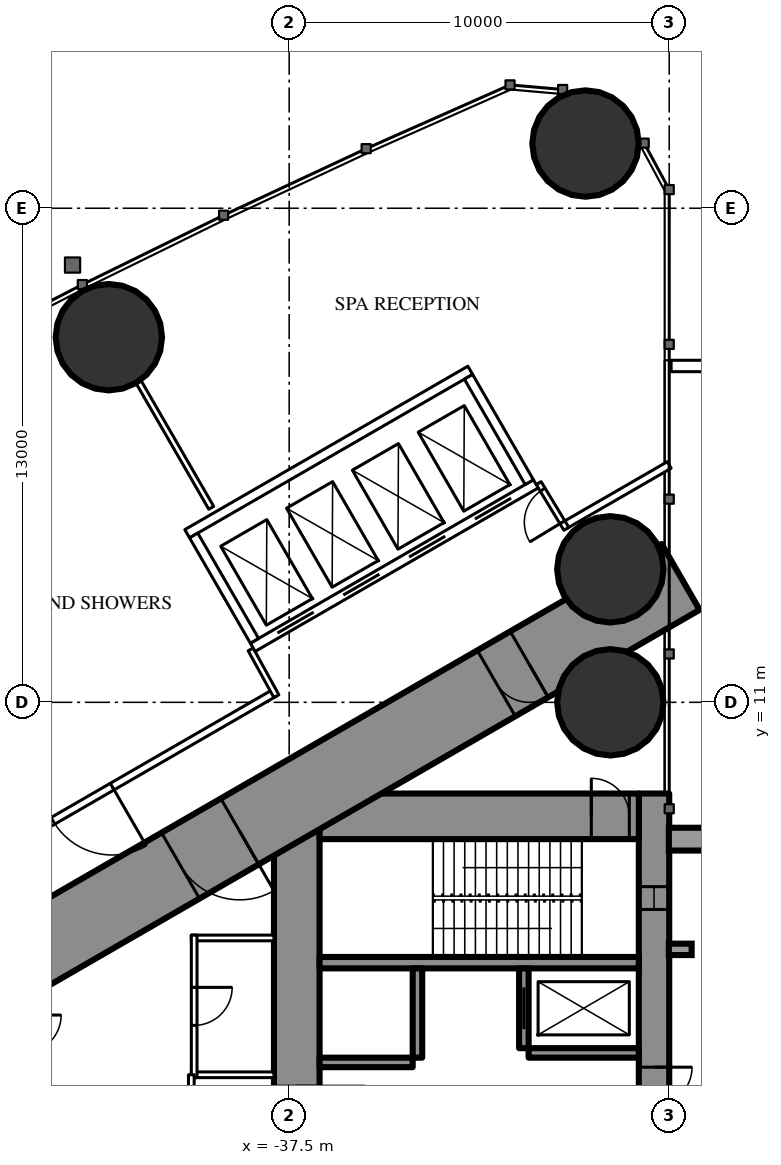
"""IFC4 building model, lengths in metres.
Left out: names, types, materials, properties, quantities, classifications, styles, units other than length and angle.
Written with IfcOpenShell. Run it as: python <this file> out.ifc"""

import sys

from ifc_helpers import new_model, si_unit, direction, frame, frame_2d, origin, origin_2d, place, context, subcontext, project, spatial, rectangle, hollow_circle, extrude, element, fill, save


model = new_model("IFC4")
c1 = context("Model", 3, precision=1e-05, world=origin(), true_north=direction((0.0, 1.0)))
c2 = subcontext(c1, "Body", "Model", "MODEL_VIEW")
j1 = project(units=[si_unit("LENGTHUNIT", "METRE"), si_unit("PLANEANGLEUNIT", "RADIAN")], contexts=[c1])
p1 = place(None, origin())
s1 = spatial("IfcSite", under=j1, at=p1, CompositionType="ELEMENT")
p2 = place(p1, origin())
s2 = spatial("IfcBuilding", under=s1, at=p2, CompositionType="ELEMENT")
p3 = place(p2, frame((0.0, 0.0, 12.6)))
s3 = spatial("IfcBuildingStorey", under=s2, at=p3, CompositionType="ELEMENT", Elevation=12.6)
for number, where, z_axis, x_axis in (
    (1, (-29.703, 25.703, 0.0), (0.0, 0.0, 1.0), (1.0, 0.0, 0.0)),
    (2, (-29.05, 11.0, 0.0), (0.0, 0.0, 1.0), (1.0, 0.0, 0.0)),
    (3, (-29.05, 14.5, 0.0), (0.0, 0.0, 1.0), (1.0, 0.0, 0.0)),
    (4, (-42.245, 20.607, 0.0), (0.0, 0.0, 1.0), (1.0, 0.0, 0.0)),
):
    element("IfcColumn", number, at=place(p3, frame(where, z_axis=z_axis, x_axis=x_axis)), inside=s3, PredefinedType="COLUMN", context=c2, shape_type="SweptSolid", body=[
        extrude(hollow_circle(Radius=1.4, WallThickness=0.12, at=origin_2d()), origin(), (0.0, 0.0, 1.0), 5.4),
    ])
p4 = place(p3, frame((-27.9, 8.6, 0.0), z_axis=(0.0, 0.0, 1.0), x_axis=(0.0, -1.0, 0.0)))
e5 = element("IfcWall", 5, at=p4, inside=s3, PredefinedType="SHEAR", context=c2, shape_type="SweptSolid", body=[
    extrude(rectangle(XDim=17.2, YDim=0.8, at=frame_2d((8.6, 0.0))), origin(), (0.0, 0.0, 1.0), 5.4),
])
p5 = place(p4, frame((7.2, 0.0, 0.0)))
e6 = element("IfcOpeningElement", 6, at=p5, cuts=e5, PredefinedType="OPENING", context=c2, shape_type="SweptSolid", body=[
    extrude(rectangle(XDim=1.0, YDim=2.2, at=frame_2d((0.5, 1.1))), frame((0.0, 0.41, 0.0), z_axis=(0.0, -1.0, 0.0), x_axis=(1.0, 0.0, 0.0)), (0.0, 0.0, 1.0), 0.82),
])
p6 = place(p4, frame((2.45, 0.0, 0.6)))
e7 = element("IfcOpeningElement", 7, at=p6, cuts=e5, PredefinedType="OPENING", context=c2, shape_type="SweptSolid", body=[
    extrude(rectangle(XDim=0.6, YDim=3.9, at=frame_2d((0.3, 1.95))), frame((0.0, 0.41, 0.0), z_axis=(0.0, -1.0, 0.0), x_axis=(1.0, 0.0, 0.0)), (0.0, 0.0, 1.0), 0.82),
])
p7 = place(p4, frame((14.15, 0.0, 0.6)))
e8 = element("IfcOpeningElement", 8, at=p7, cuts=e5, PredefinedType="OPENING", context=c2, shape_type="SweptSolid", body=[
    extrude(rectangle(XDim=0.6, YDim=3.9, at=frame_2d((0.3, 1.95))), frame((0.0, 0.41, 0.0), z_axis=(0.0, -1.0, 0.0), x_axis=(1.0, 0.0, 0.0)), (0.0, 0.0, 1.0), 0.82),
])
p8 = place(p3, frame((-37.3, 8.6, 0.0), z_axis=(0.0, 0.0, 1.0), x_axis=(0.0, -1.0, 0.0)))
e9 = element("IfcWall", 9, at=p8, inside=s3, PredefinedType="SHEAR", context=c2, shape_type="SweptSolid", body=[
    extrude(rectangle(XDim=17.2, YDim=1.2, at=frame_2d((8.6, 0.0))), origin(), (0.0, 0.0, 1.0), 5.4),
])
p9 = place(p8, frame((7.7, 0.0, 0.0)))
e10 = element("IfcOpeningElement", 10, at=p9, cuts=e9, PredefinedType="OPENING", context=c2, shape_type="SweptSolid", body=[
    extrude(rectangle(XDim=1.8, YDim=2.2, at=frame_2d((0.9, 1.1))), frame((0.0, 0.61, 0.0), z_axis=(0.0, -1.0, 0.0), x_axis=(1.0, 0.0, 0.0)), (0.0, 0.0, 1.0), 1.22),
])
p10 = place(p3, frame((-28.3, 8.0, 0.0), z_axis=(0.0, 0.0, 1.0), x_axis=(-1.0, 0.0, 0.0)))
e11 = element("IfcWall", 11, at=p10, inside=s3, PredefinedType="SHEAR", context=c2, shape_type="SweptSolid", body=[
    extrude(rectangle(XDim=8.4, YDim=1.2, at=frame_2d((4.2, 0.0))), origin(), (0.0, 0.0, 1.0), 5.4),
])
p11 = place(p10, frame((0.25, 0.0, 0.0)))
e12 = element("IfcOpeningElement", 12, at=p11, cuts=e11, PredefinedType="OPENING", context=c2, shape_type="SweptSolid", body=[
    extrude(rectangle(XDim=1.0, YDim=2.2, at=frame_2d((0.5, 1.1))), frame((0.0, 0.61, 0.0), z_axis=(0.0, -1.0, 0.0), x_axis=(1.0, 0.0, 0.0)), (0.0, 0.0, 1.0), 1.22),
])
p12 = place(p3, frame((-28.3, 4.15, 0.0), z_axis=(0.0, 0.0, 1.0), x_axis=(-1.0, 0.0, 0.0)))
e13 = element("IfcWall", 13, at=p12, inside=s3, PredefinedType="SHEAR", context=c2, shape_type="SweptSolid", body=[
    extrude(rectangle(XDim=8.4, YDim=0.3, at=frame_2d((4.2, 0.0))), origin(), (0.0, 0.0, 1.0), 5.4),
])
p13 = place(p3, frame((-31.325, 4.0, 0.0), z_axis=(0.0, 0.0, 1.0), x_axis=(0.0, -1.0, 0.0)))
e14 = element("IfcWall", 14, at=p13, inside=s3, PredefinedType="SHEAR", context=c2, shape_type="SweptSolid", body=[
    extrude(rectangle(XDim=2.1, YDim=0.25, at=frame_2d((1.05, 0.0))), origin(), (0.0, 0.0, 1.0), 5.4),
])
p14 = place(p13, frame((0.5, 0.0, 0.0)))
e15 = element("IfcOpeningElement", 15, at=p14, cuts=e14, PredefinedType="OPENING", context=c2, shape_type="SweptSolid", body=[
    extrude(rectangle(XDim=1.1, YDim=2.2, at=frame_2d((0.55, 1.1))), frame((0.0, 0.135, 0.0), z_axis=(0.0, -1.0, 0.0), x_axis=(1.0, 0.0, 0.0)), (0.0, 0.0, 1.0), 0.27),
])
p15 = place(p3, frame((-34.125, 4.0, 0.0), z_axis=(0.0, 0.0, 1.0), x_axis=(0.0, -1.0, 0.0)))
e16 = element("IfcWall", 16, at=p15, inside=s3, PredefinedType="SHEAR", context=c2, shape_type="SweptSolid", body=[
    extrude(rectangle(XDim=2.35, YDim=0.25, at=frame_2d((1.175, 0.0))), origin(), (0.0, 0.0, 1.0), 5.4),
])
p16 = place(p3, frame((-28.3, 1.775, 0.0), z_axis=(0.0, 0.0, 1.0), x_axis=(-1.0, 0.0, 0.0)))
e17 = element("IfcWall", 17, at=p16, inside=s3, PredefinedType="SHEAR", context=c2, shape_type="SweptSolid", body=[
    extrude(rectangle(XDim=2.9, YDim=0.25, at=frame_2d((1.45, 0.0))), origin(), (0.0, 0.0, 1.0), 5.4),
])
p17 = place(p3, frame((-34.25, 1.525, 0.0), z_axis=(0.0, 0.0, 1.0), x_axis=(-1.0, 0.0, 0.0)))
e18 = element("IfcWall", 18, at=p17, inside=s3, PredefinedType="SHEAR", context=c2, shape_type="SweptSolid", body=[
    extrude(rectangle(XDim=2.45, YDim=0.25, at=frame_2d((1.225, 0.0))), origin(), (0.0, 0.0, 1.0), 5.4),
])
p18 = place(p3, frame((-27.2, 14.3, 0.0), z_axis=(0.0, 0.0, 1.0), x_axis=(-0.866026593062, -0.499997940104, 0.0)))
e19 = element("IfcWall", 19, at=p18, inside=s3, PredefinedType="SHEAR", context=c2, shape_type="SweptSolid", body=[
    extrude(rectangle(XDim=28.946, YDim=2.0, at=frame_2d((14.473, 0.0))), origin(), (0.0, 0.0, 1.0), 5.4),
])
p19 = place(p18, frame((4.6, 0.0, 0.0)))
e20 = element("IfcOpeningElement", 20, at=p19, cuts=e19, PredefinedType="OPENING", context=c2, shape_type="SweptSolid", body=[
    extrude(rectangle(XDim=1.0, YDim=2.2, at=frame_2d((0.5, 1.1))), frame((0.0, 1.01, 0.0), z_axis=(0.0, -1.0, 0.0), x_axis=(1.0, 0.0, 0.0)), (0.0, 0.0, 1.0), 2.02),
])
p20 = place(p18, frame((13.395, 0.0, 0.0)))
e21 = element("IfcOpeningElement", 21, at=p20, cuts=e19, PredefinedType="OPENING", context=c2, shape_type="SweptSolid", body=[
    extrude(rectangle(XDim=1.8, YDim=2.2, at=frame_2d((0.9, 1.1))), frame((0.0, 1.01, 0.0), z_axis=(0.0, -1.0, 0.0), x_axis=(1.0, 0.0, 0.0)), (0.0, 0.0, 1.0), 2.02),
])
p21 = place(p3, frame((-27.45, 19.85, 0.0), z_axis=(0.0, 0.0, 1.0), x_axis=(1.0, 0.0, 0.0)))
e22 = element("IfcWall", 22, at=p21, inside=s3, PredefinedType="PARAPET", context=c2, shape_type="SweptSolid", body=[
    extrude(rectangle(XDim=54.9, YDim=0.3, at=frame_2d((27.45, 0.0))), origin(), (0.0, 0.0, 1.0), 1.1),
])
p22 = place(p3, frame((-39.551, 16.119, 0.0), z_axis=(0.0, 0.0, 1.0), x_axis=(-0.500014214979, 0.866017196607, 0.0)))
e23 = element("IfcWall", 23, at=p22, inside=s3, PredefinedType="PARTITIONING", context=c2, shape_type="SweptSolid", body=[
    extrude(rectangle(XDim=3.815, YDim=0.15, at=frame_2d((1.907, 0.0))), origin(), (0.0, 0.0, 1.0), 5.15),
])
p23 = place(p3, frame((-27.5, 17.244, 0.0), z_axis=(0.0, 0.0, 1.0), x_axis=(-0.866039316896, -0.499975901009, 0.0)))
e24 = element("IfcWall", 24, at=p23, inside=s3, PredefinedType="PARTITIONING", context=c2, shape_type="SweptSolid", body=[
    extrude(rectangle(XDim=3.169, YDim=0.2, at=frame_2d((1.584, 0.0))), origin(), (0.0, 0.0, 1.0), 4.25),
])
p24 = place(p3, frame((-37.9, 11.24, 0.0), z_axis=(0.0, 0.0, 1.0), x_axis=(-0.866022995118, -0.50000417191, 0.0)))
e25 = element("IfcWall", 25, at=p24, inside=s3, PredefinedType="PARTITIONING", context=c2, shape_type="SweptSolid", body=[
    extrude(rectangle(XDim=22.48, YDim=0.2, at=frame_2d((11.24, 0.0))), origin(), (0.0, 0.0, 1.0), 4.25),
])
p25 = place(p24, frame((14.644, 0.0, 0.0)))
e26 = element("IfcOpeningElement", 26, at=p25, cuts=e25, PredefinedType="OPENING", context=c2, shape_type="SweptSolid", body=[
    extrude(rectangle(XDim=1.8, YDim=2.2, at=frame_2d((0.9, 1.1))), frame((0.0, 0.11, 0.0), z_axis=(0.0, -1.0, 0.0), x_axis=(1.0, 0.0, 0.0)), (0.0, 0.0, 1.0), 0.22),
])
p26 = place(p24, frame((20.069, 0.0, 0.0)))
e27 = element("IfcOpeningElement", 27, at=p26, cuts=e25, PredefinedType="OPENING", context=c2, shape_type="SweptSolid", body=[
    extrude(rectangle(XDim=1.8, YDim=2.2, at=frame_2d((0.9, 1.1))), frame((0.0, 0.11, 0.0), z_axis=(0.0, -1.0, 0.0), x_axis=(1.0, 0.0, 0.0)), (0.0, 0.0, 1.0), 0.22),
])
p27 = place(p24, frame((4.915, 0.0, 0.0)))
e28 = element("IfcOpeningElement", 28, at=p27, cuts=e25, PredefinedType="OPENING", context=c2, shape_type="SweptSolid", body=[
    extrude(rectangle(XDim=1.8, YDim=2.2, at=frame_2d((0.9, 1.1))), frame((0.0, 0.11, 0.0), z_axis=(0.0, -1.0, 0.0), x_axis=(1.0, 0.0, 0.0)), (0.0, 0.0, 1.0), 0.22),
])
p28 = place(p3, frame((-30.207, 15.566, 0.0), z_axis=(0.0, 0.0, 1.0), x_axis=(-0.518374889333, 0.855153479855, 0.0)))
e29 = element("IfcWall", 29, at=p28, inside=s3, PredefinedType="PARTITIONING", context=c2, shape_type="SweptSolid", body=[
    extrude(rectangle(XDim=1.405, YDim=0.15, at=frame_2d((0.703, 0.0))), origin(), (0.0, 0.0, 1.0), 5.15),
])
p29 = place(p28, frame((0.202, 0.0, 0.0)))
e30 = element("IfcOpeningElement", 30, at=p29, cuts=e29, PredefinedType="OPENING", context=c2, shape_type="SweptSolid", body=[
    extrude(rectangle(XDim=1.0, YDim=2.2, at=frame_2d((0.5, 1.1))), frame((0.0, 0.085, 0.0), z_axis=(0.0, -1.0, 0.0), x_axis=(1.0, 0.0, 0.0)), (0.0, 0.0, 1.0), 0.17),
])
p30 = place(p3, frame((-38.513, 12.392, 0.0), z_axis=(0.0, 0.0, 1.0), x_axis=(0.481358300093, -0.876523922624, 0.0)))
e31 = element("IfcWall", 31, at=p30, inside=s3, PredefinedType="PARTITIONING", context=c2, shape_type="SweptSolid", body=[
    extrude(rectangle(XDim=1.405, YDim=0.15, at=frame_2d((0.703, 0.0))), origin(), (0.0, 0.0, 1.0), 5.15),
])
for number, where, z_axis, x_axis in (
    (32, (-37.9, 1.2, 0.0), (0.0, 0.0, 1.0), (-1.0, 0.0, 0.0)),
    (33, (-37.9, 4.8, 0.0), (0.0, 0.0, 1.0), (-1.0, 0.0, 0.0)),
):
    element("IfcWall", number, at=place(p3, frame(where, z_axis=z_axis, x_axis=x_axis)), inside=s3, PredefinedType="PARTITIONING", context=c2, shape_type="SweptSolid", body=[
        extrude(rectangle(XDim=2.175, YDim=0.15, at=frame_2d((1.087, 0.0))), origin(), (0.0, 0.0, 1.0), 5.15),
    ])
p31 = place(p3, frame((-40.0, 4.875, 0.0), z_axis=(0.0, 0.0, 1.0), x_axis=(0.0, -1.0, 0.0)))
e34 = element("IfcWall", 34, at=p31, inside=s3, PredefinedType="PARTITIONING", context=c2, shape_type="SweptSolid", body=[
    extrude(rectangle(XDim=3.75, YDim=0.15, at=frame_2d((1.875, 0.0))), origin(), (0.0, 0.0, 1.0), 5.15),
])
p32 = place(p31, frame((1.375, 0.0, 0.0)))
e35 = element("IfcOpeningElement", 35, at=p32, cuts=e34, PredefinedType="OPENING", context=c2, shape_type="SweptSolid", body=[
    extrude(rectangle(XDim=1.0, YDim=2.2, at=frame_2d((0.5, 1.1))), frame((0.0, 0.085, 0.0), z_axis=(0.0, -1.0, 0.0), x_axis=(1.0, 0.0, 0.0)), (0.0, 0.0, 1.0), 0.17),
])
p33 = place(p3, frame((-40.075, 1.2, 0.0), z_axis=(0.0, 0.0, 1.0), x_axis=(0.0, -1.0, 0.0)))
e36 = element("IfcWall", 36, at=p33, inside=s3, PredefinedType="PARTITIONING", context=c2, shape_type="SweptSolid", body=[
    extrude(rectangle(XDim=6.912, YDim=0.15, at=frame_2d((3.456, 0.0))), origin(), (0.0, 0.0, 1.0), 5.15),
])
p34 = place(p33, frame((2.556, 0.0, 0.0)))
e37 = element("IfcOpeningElement", 37, at=p34, cuts=e36, PredefinedType="OPENING", context=c2, shape_type="SweptSolid", body=[
    extrude(rectangle(XDim=1.8, YDim=2.2, at=frame_2d((0.9, 1.1))), frame((0.0, 0.085, 0.0), z_axis=(0.0, -1.0, 0.0), x_axis=(1.0, 0.0, 0.0)), (0.0, 0.0, 1.0), 0.17),
])
p35 = place(p3, frame((-31.01, 16.747, 0.0), z_axis=(0.0, 0.0, 1.0), x_axis=(-0.866028165386, -0.499995216735, 0.0)))
e38 = element("IfcWall", 38, at=p35, inside=s3, PredefinedType="PARTITIONING", context=c2, shape_type="SweptSolid", body=[
    extrude(rectangle(XDim=8.6, YDim=0.25, at=frame_2d((4.3, 0.0))), origin(), (0.0, 0.0, 1.0), 5.15),
])
p36 = place(p35, frame((0.75, 0.0, 0.0)))
e39 = element("IfcOpeningElement", 39, at=p36, cuts=e38, PredefinedType="OPENING", context=c2, shape_type="SweptSolid", body=[
    extrude(rectangle(XDim=1.1, YDim=2.2, at=frame_2d((0.55, 1.1))), frame((0.0, 0.135, 0.0), z_axis=(0.0, -1.0, 0.0), x_axis=(1.0, 0.0, 0.0)), (0.0, 0.0, 1.0), 0.27),
])
p37 = place(p35, frame((2.75, 0.0, 0.0)))
e40 = element("IfcOpeningElement", 40, at=p37, cuts=e38, PredefinedType="OPENING", context=c2, shape_type="SweptSolid", body=[
    extrude(rectangle(XDim=1.1, YDim=2.2, at=frame_2d((0.55, 1.1))), frame((0.0, 0.135, 0.0), z_axis=(0.0, -1.0, 0.0), x_axis=(1.0, 0.0, 0.0)), (0.0, 0.0, 1.0), 0.27),
])
p38 = place(p35, frame((4.75, 0.0, 0.0)))
e41 = element("IfcOpeningElement", 41, at=p38, cuts=e38, PredefinedType="OPENING", context=c2, shape_type="SweptSolid", body=[
    extrude(rectangle(XDim=1.1, YDim=2.2, at=frame_2d((0.55, 1.1))), frame((0.0, 0.135, 0.0), z_axis=(0.0, -1.0, 0.0), x_axis=(1.0, 0.0, 0.0)), (0.0, 0.0, 1.0), 0.27),
])
p39 = place(p35, frame((6.75, 0.0, 0.0)))
e42 = element("IfcOpeningElement", 42, at=p39, cuts=e38, PredefinedType="OPENING", context=c2, shape_type="SweptSolid", body=[
    extrude(rectangle(XDim=1.1, YDim=2.2, at=frame_2d((0.55, 1.1))), frame((0.0, 0.135, 0.0), z_axis=(0.0, -1.0, 0.0), x_axis=(1.0, 0.0, 0.0)), (0.0, 0.0, 1.0), 0.27),
])
p40 = place(p3, frame((-32.736, 19.736, 0.0), z_axis=(0.0, 0.0, 1.0), x_axis=(-0.866028165386, -0.499995216735, 0.0)))
e43 = element("IfcWall", 43, at=p40, inside=s3, PredefinedType="PARTITIONING", context=c2, shape_type="SweptSolid", body=[
    extrude(rectangle(XDim=8.6, YDim=0.25, at=frame_2d((4.3, 0.0))), origin(), (0.0, 0.0, 1.0), 5.15),
])
p41 = place(p3, frame((-31.181, 16.793, 0.0), z_axis=(0.0, 0.0, 1.0), x_axis=(-0.499929347863, 0.866066190972, 0.0)))
e44 = element("IfcWall", 44, at=p41, inside=s3, PredefinedType="PARTITIONING", context=c2, shape_type="SweptSolid", body=[
    extrude(rectangle(XDim=3.201, YDim=0.25, at=frame_2d((1.6, 0.0))), origin(), (0.0, 0.0, 1.0), 5.15),
])
p42 = place(p3, frame((-38.413, 12.618, 0.0), z_axis=(0.0, 0.0, 1.0), x_axis=(-0.499872130319, 0.866099216793, 0.0)))
e45 = element("IfcWall", 45, at=p42, inside=s3, PredefinedType="PARTITIONING", context=c2, shape_type="SweptSolid", body=[
    extrude(rectangle(XDim=3.2, YDim=0.25, at=frame_2d((1.6, 0.0))), origin(), (0.0, 0.0, 1.0), 5.15),
])
p43 = place(p29, origin())
e46 = element("IfcDoor", 46, at=p43, inside=s3, OperationType="SINGLE_SWING_LEFT", PredefinedType="DOOR", context=c2, shape_type="SweptSolid", body=[
    extrude(rectangle(XDim=1.0, YDim=2.2, at=frame_2d((0.5, 1.1))), frame((0.0, 0.025, 0.0), z_axis=(0.0, -1.0, 0.0), x_axis=(1.0, 0.0, 0.0)), (0.0, 0.0, 1.0), 0.05),
])
fill(e30, e46)
p44 = place(p27, origin())
e47 = element("IfcDoor", 47, at=p44, inside=s3, OperationType="DOUBLE_DOOR_SINGLE_SWING", PredefinedType="DOOR", context=c2, shape_type="SweptSolid", body=[
    extrude(rectangle(XDim=1.8, YDim=2.2, at=frame_2d((0.9, 1.1))), frame((0.0, 0.025, 0.0), z_axis=(0.0, -1.0, 0.0), x_axis=(1.0, 0.0, 0.0)), (0.0, 0.0, 1.0), 0.05),
])
fill(e28, e47)
p45 = place(p32, origin())
e48 = element("IfcDoor", 48, at=p45, inside=s3, OperationType="SINGLE_SWING_LEFT", PredefinedType="DOOR", context=c2, shape_type="SweptSolid", body=[
    extrude(rectangle(XDim=1.0, YDim=2.2, at=frame_2d((0.5, 1.1))), frame((0.0, 0.025, 0.0), z_axis=(0.0, -1.0, 0.0), x_axis=(1.0, 0.0, 0.0)), (0.0, 0.0, 1.0), 0.05),
])
fill(e35, e48)
p46 = place(p19, origin())
e49 = element("IfcDoor", 49, at=p46, inside=s3, OperationType="SINGLE_SWING_LEFT", PredefinedType="DOOR", context=c2, shape_type="SweptSolid", body=[
    extrude(rectangle(XDim=1.0, YDim=2.2, at=frame_2d((0.5, 1.1))), frame((0.0, 0.025, 0.0), z_axis=(0.0, -1.0, 0.0), x_axis=(1.0, 0.0, 0.0)), (0.0, 0.0, 1.0), 0.05),
])
fill(e20, e49)
p47 = place(p20, origin())
e50 = element("IfcDoor", 50, at=p47, inside=s3, OperationType="DOUBLE_DOOR_SINGLE_SWING", PredefinedType="DOOR", context=c2, shape_type="SweptSolid", body=[
    extrude(rectangle(XDim=1.8, YDim=2.2, at=frame_2d((0.9, 1.1))), frame((0.0, 0.025, 0.0), z_axis=(0.0, -1.0, 0.0), x_axis=(1.0, 0.0, 0.0)), (0.0, 0.0, 1.0), 0.05),
])
fill(e21, e50)
p48 = place(p9, origin())
e51 = element("IfcDoor", 51, at=p48, inside=s3, OperationType="DOUBLE_DOOR_SINGLE_SWING", PredefinedType="DOOR", context=c2, shape_type="SweptSolid", body=[
    extrude(rectangle(XDim=1.8, YDim=2.2, at=frame_2d((0.9, 1.1))), frame((0.0, 0.025, 0.0), z_axis=(0.0, -1.0, 0.0), x_axis=(1.0, 0.0, 0.0)), (0.0, 0.0, 1.0), 0.05),
])
fill(e10, e51)
p49 = place(p11, origin())
e52 = element("IfcDoor", 52, at=p49, inside=s3, OperationType="SINGLE_SWING_RIGHT", PredefinedType="DOOR", context=c2, shape_type="SweptSolid", body=[
    extrude(rectangle(XDim=1.0, YDim=2.2, at=frame_2d((0.5, 1.1))), frame((0.0, 0.025, 0.0), z_axis=(0.0, -1.0, 0.0), x_axis=(1.0, 0.0, 0.0)), (0.0, 0.0, 1.0), 0.05),
])
fill(e12, e52)
p50 = place(p5, origin())
e53 = element("IfcDoor", 53, at=p50, inside=s3, OperationType="SINGLE_SWING_LEFT", PredefinedType="DOOR", context=c2, shape_type="SweptSolid", body=[
    extrude(rectangle(XDim=1.0, YDim=2.2, at=frame_2d((0.5, 1.1))), frame((0.0, 0.025, 0.0), z_axis=(0.0, -1.0, 0.0), x_axis=(1.0, 0.0, 0.0)), (0.0, 0.0, 1.0), 0.05),
])
fill(e6, e53)
p51 = place(p14, origin())
e54 = element("IfcDoor", 54, at=p51, inside=s3, OperationType="SLIDING_TO_LEFT", PredefinedType="USERDEFINED", context=c2, shape_type="SweptSolid", body=[
    extrude(rectangle(XDim=1.1, YDim=2.2, at=frame_2d((0.55, 1.1))), frame((0.0, 0.025, 0.0), z_axis=(0.0, -1.0, 0.0), x_axis=(1.0, 0.0, 0.0)), (0.0, 0.0, 1.0), 0.05),
])
fill(e15, e54)
p52 = place(p36, origin())
e55 = element("IfcDoor", 55, at=p52, inside=s3, OperationType="DOUBLE_DOOR_SLIDING", PredefinedType="USERDEFINED", context=c2, shape_type="SweptSolid", body=[
    extrude(rectangle(XDim=1.1, YDim=2.2, at=frame_2d((0.55, 1.1))), frame((0.0, 0.025, 0.0), z_axis=(0.0, -1.0, 0.0), x_axis=(1.0, 0.0, 0.0)), (0.0, 0.0, 1.0), 0.05),
])
fill(e39, e55)
p53 = place(p37, origin())
e56 = element("IfcDoor", 56, at=p53, inside=s3, OperationType="DOUBLE_DOOR_SLIDING", PredefinedType="USERDEFINED", context=c2, shape_type="SweptSolid", body=[
    extrude(rectangle(XDim=1.1, YDim=2.2, at=frame_2d((0.55, 1.1))), frame((0.0, 0.025, 0.0), z_axis=(0.0, -1.0, 0.0), x_axis=(1.0, 0.0, 0.0)), (0.0, 0.0, 1.0), 0.05),
])
fill(e40, e56)
p54 = place(p38, origin())
e57 = element("IfcDoor", 57, at=p54, inside=s3, OperationType="DOUBLE_DOOR_SLIDING", PredefinedType="USERDEFINED", context=c2, shape_type="SweptSolid", body=[
    extrude(rectangle(XDim=1.1, YDim=2.2, at=frame_2d((0.55, 1.1))), frame((0.0, 0.025, 0.0), z_axis=(0.0, -1.0, 0.0), x_axis=(1.0, 0.0, 0.0)), (0.0, 0.0, 1.0), 0.05),
])
fill(e41, e57)
p55 = place(p39, origin())
e58 = element("IfcDoor", 58, at=p55, inside=s3, OperationType="DOUBLE_DOOR_SLIDING", PredefinedType="USERDEFINED", context=c2, shape_type="SweptSolid", body=[
    extrude(rectangle(XDim=1.1, YDim=2.2, at=frame_2d((0.55, 1.1))), frame((0.0, 0.025, 0.0), z_axis=(0.0, -1.0, 0.0), x_axis=(1.0, 0.0, 0.0)), (0.0, 0.0, 1.0), 0.05),
])
fill(e42, e58)
p56 = place(p6, origin())
e59 = element("IfcWindow", 59, at=p56, inside=s3, PartitioningType="SINGLE_PANEL", PredefinedType="WINDOW", context=c2, shape_type="SweptSolid", body=[
    extrude(rectangle(XDim=0.6, YDim=3.9, at=frame_2d((0.3, 1.95))), frame((0.0, 0.03, 0.0), z_axis=(0.0, -1.0, 0.0), x_axis=(1.0, 0.0, 0.0)), (0.0, 0.0, 1.0), 0.06),
])
fill(e7, e59)
save(model, sys.argv[1])
